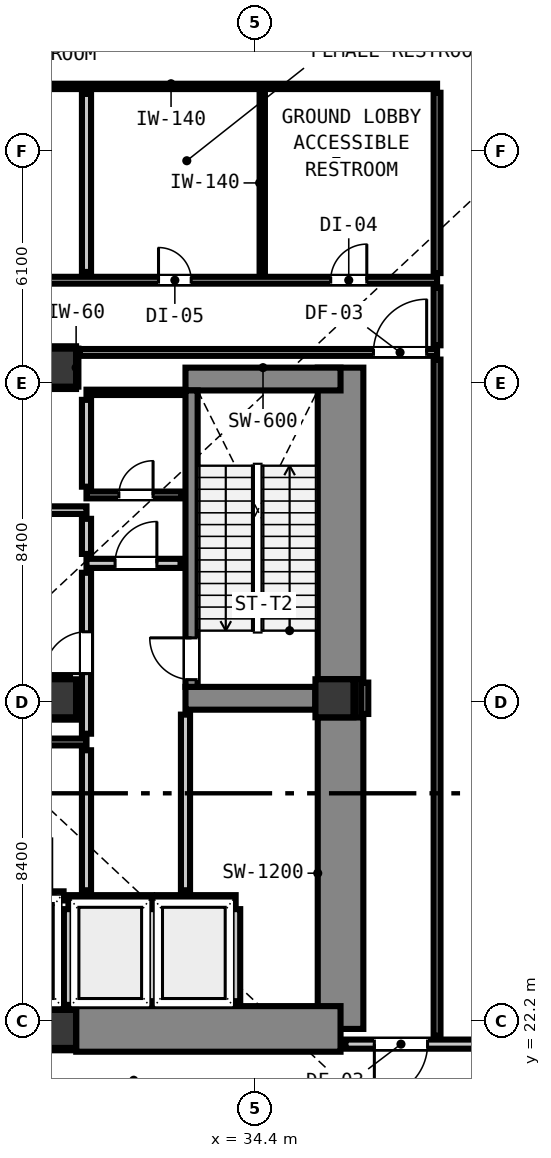
"""IFC4 building model, lengths in metres.
Left out: names, types, materials, properties, quantities, classifications, styles, units other than length and angle.
Written with IfcOpenShell. Run it as: python <this file> out.ifc"""

import sys

from ifc_helpers import new_model, si_unit, direction, frame, frame_2d, origin, origin_2d, place, context, subcontext, project, spatial, rectangle, extrude, element, fill, save


model = new_model("IFC4")
c1 = context("Model", 3, precision=1e-05, world=origin(), true_north=direction((0.0, 1.0)))
c2 = subcontext(c1, "Body", "Model", "MODEL_VIEW")
j1 = project(units=[si_unit("LENGTHUNIT", "METRE"), si_unit("PLANEANGLEUNIT", "RADIAN")], contexts=[c1])
p1 = place(None, origin())
s1 = spatial("IfcSite", under=j1, at=p1, CompositionType="ELEMENT")
p2 = place(p1, origin())
s2 = spatial("IfcBuilding", under=s1, at=p2, CompositionType="ELEMENT")
p3 = place(p2, origin())
s3 = spatial("IfcBuildingStorey", under=s2, at=p3, CompositionType="ELEMENT", Elevation=0.0)
for number, where, z_axis, x_axis in (
    (1, (29.2, 22.0, 0.0), (0.0, 0.0, 1.0), (1.0, 0.0, 0.0)),
    (2, (29.2, 39.4, 0.0), (0.0, 0.0, 1.0), (1.0, 0.0, 0.0)),
    (3, (36.5, 30.7, 0.0), (0.0, 0.0, 1.0), (1.0, 0.0, 0.0)),
):
    element("IfcColumn", number, at=place(p3, frame(where, z_axis=z_axis, x_axis=x_axis)), inside=s3, PredefinedType="COLUMN", context=c2, shape_type="SweptSolid", body=[
        extrude(rectangle(XDim=1.0, YDim=1.0, at=origin_2d()), origin(), (0.0, 0.0, 1.0), 5.2),
    ])
p4 = place(p3, frame((36.66, 22.0, 0.0), z_axis=(0.0, 0.0, 1.0), x_axis=(0.0, 1.0, 0.0)))
e4 = element("IfcWall", 4, at=p4, inside=s3, PredefinedType="SHEAR", context=c2, shape_type="SweptSolid", body=[
    extrude(rectangle(XDim=8.195, YDim=1.2, at=frame_2d((4.098, 0.0))), origin(), (0.0, 0.0, 1.0), 5.2),
])
p5 = place(p3, frame((36.66, 31.205, 0.0), z_axis=(0.0, 0.0, 1.0), x_axis=(0.0, 1.0, 0.0)))
e5 = element("IfcWall", 5, at=p5, inside=s3, PredefinedType="SHEAR", context=c2, shape_type="SweptSolid", body=[
    extrude(rectangle(XDim=8.195, YDim=1.2, at=frame_2d((4.097, 0.0))), origin(), (0.0, 0.0, 1.0), 5.2),
])
p6 = place(p3, frame((29.705, 22.0, 0.0), z_axis=(0.0, 0.0, 1.0), x_axis=(1.0, 0.0, 0.0)))
e6 = element("IfcWall", 6, at=p6, inside=s3, PredefinedType="SHEAR", context=c2, shape_type="SweptSolid", body=[
    extrude(rectangle(XDim=6.955, YDim=1.2, at=frame_2d((3.478, 0.0))), origin(), (0.0, 0.0, 1.0), 5.2),
])
p7 = place(p3, frame((32.58, 39.1, 0.0), z_axis=(0.0, 0.0, 1.0), x_axis=(1.0, 0.0, 0.0)))
e7 = element("IfcWall", 7, at=p7, inside=s3, PredefinedType="SHEAR", context=c2, shape_type="SweptSolid", body=[
    extrude(rectangle(XDim=4.08, YDim=0.6, at=frame_2d((2.04, 0.0))), origin(), (0.0, 0.0, 1.0), 5.2),
])
p8 = place(p3, frame((32.58, 30.7, 0.0), z_axis=(0.0, 0.0, 1.0), x_axis=(1.0, 0.0, 0.0)))
e8 = element("IfcWall", 8, at=p8, inside=s3, PredefinedType="SHEAR", context=c2, shape_type="SweptSolid", body=[
    extrude(rectangle(XDim=3.415, YDim=0.6, at=frame_2d((1.708, 0.0))), origin(), (0.0, 0.0, 1.0), 5.2),
])
p9 = place(p3, frame((32.74, 31.0, 0.0), z_axis=(0.0, 0.0, 1.0), x_axis=(0.0, 1.0, 0.0)))
e9 = element("IfcWall", 9, at=p9, inside=s3, PredefinedType="SHEAR", context=c2, shape_type="SweptSolid", body=[
    extrude(rectangle(XDim=7.8, YDim=0.32, at=frame_2d((3.9, 0.0))), origin(), (0.0, 0.0, 1.0), 5.2),
])
p10 = place(p9, frame((0.19, 0.0, 0.0)))
e10 = element("IfcOpeningElement", 10, at=p10, cuts=e9, PredefinedType="OPENING", context=c2, shape_type="SweptSolid", body=[
    extrude(rectangle(XDim=1.1, YDim=2.15, at=frame_2d((0.55, 1.075))), frame((0.0, 0.17, 0.0), z_axis=(0.0, -1.0, 0.0), x_axis=(1.0, 0.0, 0.0)), (0.0, 0.0, 1.0), 0.34),
])
p11 = place(p3, frame((29.2, 30.7, 0.0), z_axis=(0.0, 0.0, 1.0), x_axis=(1.0, 0.0, 0.0)))
e11 = element("IfcColumn", 11, at=p11, inside=s3, PredefinedType="COLUMN", context=c2, shape_type="SweptSolid", body=[
    extrude(rectangle(XDim=1.0, YDim=1.0, at=origin_2d()), origin(), (0.0, 0.0, 1.0), 5.2),
])
p12 = place(p3, frame((29.5, 25.4, 0.0), z_axis=(0.0, 0.0, 1.0), x_axis=(1.0, 0.0, 0.0)))
e12 = element("IfcWall", 12, at=p12, inside=s3, PredefinedType="PARTITIONING", context=c2, shape_type="SweptSolid", body=[
    extrude(rectangle(XDim=2.2, YDim=0.24, at=frame_2d((1.1, 0.0))), origin(), (0.0, 0.0, 1.0), 4.92),
])
p13 = place(p3, frame((29.5, 22.632, 0.0), z_axis=(0.0, 0.0, 1.0), x_axis=(0.0, 1.0, 0.0)))
e13 = element("IfcWall", 13, at=p13, inside=s3, PredefinedType="PARTITIONING", context=c2, shape_type="SweptSolid", body=[
    extrude(rectangle(XDim=2.52, YDim=0.24, at=frame_2d((1.26, 0.0))), origin(), (0.0, 0.0, 1.0), 3.955),
])
p14 = place(p3, frame((31.7, 22.73, 0.0), z_axis=(0.0, 0.0, 1.0), x_axis=(0.0, 1.0, 0.0)))
e14 = element("IfcWall", 14, at=p14, inside=s3, PredefinedType="PARTITIONING", context=c2, shape_type="SweptSolid", body=[
    extrude(rectangle(XDim=2.422, YDim=0.24, at=frame_2d((1.211, 0.0))), origin(), (0.0, 0.0, 1.0), 4.92),
])
p15 = place(p3, frame((31.828, 25.4, 0.0), z_axis=(0.0, 0.0, 1.0), x_axis=(1.0, 0.0, 0.0)))
e15 = element("IfcWall", 15, at=p15, inside=s3, PredefinedType="PARTITIONING", context=c2, shape_type="SweptSolid", body=[
    extrude(rectangle(XDim=2.072, YDim=0.24, at=frame_2d((1.036, 0.0))), origin(), (0.0, 0.0, 1.0), 4.92),
])
p16 = place(p3, frame((33.9, 22.73, 0.0), z_axis=(0.0, 0.0, 1.0), x_axis=(0.0, 1.0, 0.0)))
e16 = element("IfcWall", 16, at=p16, inside=s3, PredefinedType="PARTITIONING", context=c2, shape_type="SweptSolid", body=[
    extrude(rectangle(XDim=2.422, YDim=0.24, at=frame_2d((1.211, 0.0))), origin(), (0.0, 0.0, 1.0), 4.92),
])
p17 = place(p3, frame((29.103, 25.5, 0.0), z_axis=(0.0, 0.0, 1.0), x_axis=(1.0, 0.0, 0.0)))
e17 = element("IfcWall", 17, at=p17, inside=s3, PredefinedType="PARTITIONING", context=c2, shape_type="SweptSolid", body=[
    extrude(rectangle(XDim=0.269, YDim=0.24, at=frame_2d((0.135, 0.0))), origin(), (0.0, 0.0, 1.0), 4.92),
])
p18 = place(p3, frame((44.6, 21.6, 0.0), z_axis=(0.0, 0.0, 1.0), x_axis=(-1.0, 0.0, 0.0)))
e18 = element("IfcWall", 18, at=p18, inside=s3, PredefinedType="PARTITIONING", context=c2, shape_type="SweptSolid", body=[
    extrude(rectangle(XDim=7.81, YDim=0.24, at=frame_2d((3.905, 0.0))), origin(), (0.0, 0.0, 1.0), 4.155),
])
p19 = place(p18, frame((5.65, 0.0, 0.0)))
e19 = element("IfcOpeningElement", 19, at=p19, cuts=e18, PredefinedType="OPENING", context=c2, shape_type="SweptSolid", body=[
    extrude(rectangle(XDim=1.4, YDim=2.15, at=frame_2d((0.7, 1.075))), frame((0.0, 0.13, 0.0), z_axis=(0.0, -1.0, 0.0), x_axis=(1.0, 0.0, 0.0)), (0.0, 0.0, 1.0), 0.26),
])
p20 = place(p3, frame((29.975, 34.25, 0.0), z_axis=(0.0, 0.0, 1.0), x_axis=(1.0, 0.0, 0.0)))
e20 = element("IfcWall", 20, at=p20, inside=s3, PredefinedType="PARTITIONING", context=c2, shape_type="SweptSolid", body=[
    extrude(rectangle(XDim=2.475, YDim=0.24, at=frame_2d((1.237, 0.0))), origin(), (0.0, 0.0, 1.0), 4.92),
])
p21 = place(p20, frame((0.752, 0.0, 0.0)))
e21 = element("IfcOpeningElement", 21, at=p21, cuts=e20, PredefinedType="OPENING", context=c2, shape_type="SweptSolid", body=[
    extrude(rectangle(XDim=1.1, YDim=2.15, at=frame_2d((0.55, 1.075))), frame((0.0, 0.13, 0.0), z_axis=(0.0, -1.0, 0.0), x_axis=(1.0, 0.0, 0.0)), (0.0, 0.0, 1.0), 0.26),
])
p22 = place(p3, frame((28.604, 35.65, 0.0), z_axis=(0.0, 0.0, 1.0), x_axis=(1.0, 0.0, 0.0)))
e22 = element("IfcWall", 22, at=p22, inside=s3, PredefinedType="PARTITIONING", context=c2, shape_type="SweptSolid", body=[
    extrude(rectangle(XDim=1.371, YDim=0.2, at=frame_2d((0.686, 0.0))), origin(), (0.0, 0.0, 1.0), 4.92),
])
p23 = place(p3, frame((28.593, 29.55, 0.0), z_axis=(0.0, 0.0, 1.0), x_axis=(1.0, 0.0, 0.0)))
e23 = element("IfcWall", 23, at=p23, inside=s3, PredefinedType="PARTITIONING", context=c2, shape_type="SweptSolid", body=[
    extrude(rectangle(XDim=1.382, YDim=0.18, at=frame_2d((0.691, 0.0))), origin(), (0.0, 0.0, 1.0), 4.92),
])
p24 = place(p3, frame((29.975, 36.05, 0.0), z_axis=(0.0, 0.0, 1.0), x_axis=(1.0, 0.0, 0.0)))
e24 = element("IfcWall", 24, at=p24, inside=s3, PredefinedType="PARTITIONING", context=c2, shape_type="SweptSolid", body=[
    extrude(rectangle(XDim=2.505, YDim=0.18, at=frame_2d((1.252, 0.0))), origin(), (0.0, 0.0, 1.0), 4.92),
])
p25 = place(p24, frame((0.852, 0.0, 0.0)))
e25 = element("IfcOpeningElement", 25, at=p25, cuts=e24, PredefinedType="OPENING", context=c2, shape_type="SweptSolid", body=[
    extrude(rectangle(XDim=0.9, YDim=2.1, at=frame_2d((0.45, 1.05))), frame((0.0, 0.1, 0.0), z_axis=(0.0, -1.0, 0.0), x_axis=(1.0, 0.0, 0.0)), (0.0, 0.0, 1.0), 0.2),
])
p26 = place(p3, frame((29.802, 39.8, 0.0), z_axis=(0.0, 0.0, 1.0), x_axis=(1.0, 0.0, 0.0)))
e26 = element("IfcWall", 26, at=p26, inside=s3, PredefinedType="PARTITIONING", context=c2, shape_type="SweptSolid", body=[
    extrude(rectangle(XDim=9.398, YDim=0.18, at=frame_2d((4.699, 0.0))), origin(), (0.0, 0.0, 1.0), 4.155),
])
p27 = place(p26, frame((7.724, 0.0, 0.0)))
e27 = element("IfcOpeningElement", 27, at=p27, cuts=e26, PredefinedType="OPENING", context=c2, shape_type="SweptSolid", body=[
    extrude(rectangle(XDim=1.4, YDim=2.15, at=frame_2d((0.7, 1.075))), frame((0.0, 0.1, 0.0), z_axis=(0.0, -1.0, 0.0), x_axis=(1.0, 0.0, 0.0)), (0.0, 0.0, 1.0), 0.2),
])
p28 = place(p3, frame((4.352, 41.7, 0.0), z_axis=(0.0, 0.0, 1.0), x_axis=(1.0, 0.0, 0.0)))
e28 = element("IfcWall", 28, at=p28, inside=s3, PredefinedType="PARTITIONING", context=c2, shape_type="SweptSolid", body=[
    extrude(rectangle(XDim=34.848, YDim=0.18, at=frame_2d((17.424, 0.0))), origin(), (0.0, 0.0, 1.0), 4.92),
])
p29 = place(p28, frame((18.448, 0.0, 0.0)))
e29 = element("IfcOpeningElement", 29, at=p29, cuts=e28, PredefinedType="OPENING", context=c2, shape_type="SweptSolid", body=[
    extrude(rectangle(XDim=1.4, YDim=2.15, at=frame_2d((0.7, 1.075))), frame((0.0, 0.1, 0.0), z_axis=(0.0, -1.0, 0.0), x_axis=(1.0, 0.0, 0.0)), (0.0, 0.0, 1.0), 0.2),
])
p30 = place(p28, frame((9.258, 0.0, 0.0)))
e30 = element("IfcOpeningElement", 30, at=p30, cuts=e28, PredefinedType="OPENING", context=c2, shape_type="SweptSolid", body=[
    extrude(rectangle(XDim=0.9, YDim=2.1, at=frame_2d((0.45, 1.05))), frame((0.0, 0.1, 0.0), z_axis=(0.0, -1.0, 0.0), x_axis=(1.0, 0.0, 0.0)), (0.0, 0.0, 1.0), 0.2),
])
p31 = place(p28, frame((14.898, 0.0, 0.0)))
e31 = element("IfcOpeningElement", 31, at=p31, cuts=e28, PredefinedType="OPENING", context=c2, shape_type="SweptSolid", body=[
    extrude(rectangle(XDim=0.9, YDim=2.1, at=frame_2d((0.45, 1.05))), frame((0.0, 0.1, 0.0), z_axis=(0.0, -1.0, 0.0), x_axis=(1.0, 0.0, 0.0)), (0.0, 0.0, 1.0), 0.2),
])
p32 = place(p28, frame((22.818, 0.0, 0.0)))
e32 = element("IfcOpeningElement", 32, at=p32, cuts=e28, PredefinedType="OPENING", context=c2, shape_type="SweptSolid", body=[
    extrude(rectangle(XDim=0.86, YDim=2.02, at=frame_2d((0.43, 1.01))), frame((0.0, 0.1, 0.0), z_axis=(0.0, -1.0, 0.0), x_axis=(1.0, 0.0, 0.0)), (0.0, 0.0, 1.0), 0.2),
])
p33 = place(p28, frame((27.518, 0.0, 0.0)))
e33 = element("IfcOpeningElement", 33, at=p33, cuts=e28, PredefinedType="OPENING", context=c2, shape_type="SweptSolid", body=[
    extrude(rectangle(XDim=0.86, YDim=2.02, at=frame_2d((0.43, 1.01))), frame((0.0, 0.1, 0.0), z_axis=(0.0, -1.0, 0.0), x_axis=(1.0, 0.0, 0.0)), (0.0, 0.0, 1.0), 0.2),
])
p34 = place(p28, frame((32.049, 0.0, 0.0)))
e34 = element("IfcOpeningElement", 34, at=p34, cuts=e28, PredefinedType="OPENING", context=c2, shape_type="SweptSolid", body=[
    extrude(rectangle(XDim=0.95, YDim=2.1, at=frame_2d((0.475, 1.05))), frame((0.0, 0.1, 0.0), z_axis=(0.0, -1.0, 0.0), x_axis=(1.0, 0.0, 0.0)), (0.0, 0.0, 1.0), 0.2),
])
p35 = place(p3, frame((29.975, 38.75, 0.0), z_axis=(0.0, 0.0, 1.0), x_axis=(1.0, 0.0, 0.0)))
e35 = element("IfcWall", 35, at=p35, inside=s3, PredefinedType="PARTITIONING", context=c2, shape_type="SweptSolid", body=[
    extrude(rectangle(XDim=2.525, YDim=0.14, at=frame_2d((1.262, 0.0))), origin(), (0.0, 0.0, 1.0), 4.92),
])
p36 = place(p3, frame((25.2, 46.8, 0.0), z_axis=(0.0, 0.0, 1.0), x_axis=(1.0, 0.0, 0.0)))
e36 = element("IfcWall", 36, at=p36, inside=s3, PredefinedType="PARTITIONING", context=c2, shape_type="SweptSolid", body=[
    extrude(rectangle(XDim=14.0, YDim=0.14, at=frame_2d((7.0, 0.0))), origin(), (0.0, 0.0, 1.0), 4.92),
])
p37 = place(p3, frame((29.975, 25.648, 0.0), z_axis=(0.0, 0.0, 1.0), x_axis=(0.0, 1.0, 0.0)))
e37 = element("IfcWall", 37, at=p37, inside=s3, PredefinedType="PARTITIONING", context=c2, shape_type="SweptSolid", body=[
    extrude(rectangle(XDim=3.684, YDim=0.24, at=frame_2d((1.842, 0.0))), origin(), (0.0, 0.0, 1.0), 4.92),
])
p38 = place(p3, frame((29.975, 29.768, 0.0), z_axis=(0.0, 0.0, 1.0), x_axis=(0.0, 1.0, 0.0)))
e38 = element("IfcWall", 38, at=p38, inside=s3, PredefinedType="PARTITIONING", context=c2, shape_type="SweptSolid", body=[
    extrude(rectangle(XDim=4.234, YDim=0.24, at=frame_2d((2.117, 0.0))), origin(), (0.0, 0.0, 1.0), 4.92),
])
p39 = place(p38, frame((1.582, 0.0, 0.0)))
e39 = element("IfcOpeningElement", 39, at=p39, cuts=e38, PredefinedType="OPENING", context=c2, shape_type="SweptSolid", body=[
    extrude(rectangle(XDim=1.1, YDim=2.15, at=frame_2d((0.55, 1.075))), frame((0.0, 0.13, 0.0), z_axis=(0.0, -1.0, 0.0), x_axis=(1.0, 0.0, 0.0)), (0.0, 0.0, 1.0), 0.26),
])
p40 = place(p3, frame((29.975, 34.498, 0.0), z_axis=(0.0, 0.0, 1.0), x_axis=(0.0, 1.0, 0.0)))
e40 = element("IfcWall", 40, at=p40, inside=s3, PredefinedType="PARTITIONING", context=c2, shape_type="SweptSolid", body=[
    extrude(rectangle(XDim=0.924, YDim=0.24, at=frame_2d((0.462, 0.0))), origin(), (0.0, 0.0, 1.0), 4.92),
])
p41 = place(p3, frame((29.975, 36.268, 0.0), z_axis=(0.0, 0.0, 1.0), x_axis=(0.0, 1.0, 0.0)))
e41 = element("IfcWall", 41, at=p41, inside=s3, PredefinedType="PARTITIONING", context=c2, shape_type="SweptSolid", body=[
    extrude(rectangle(XDim=2.284, YDim=0.24, at=frame_2d((1.142, 0.0))), origin(), (0.0, 0.0, 1.0), 4.92),
])
p42 = place(p3, frame((29.975, 41.918, 0.0), z_axis=(0.0, 0.0, 1.0), x_axis=(0.0, 1.0, 0.0)))
e42 = element("IfcWall", 42, at=p42, inside=s3, PredefinedType="PARTITIONING", context=c2, shape_type="SweptSolid", body=[
    extrude(rectangle(XDim=4.684, YDim=0.24, at=frame_2d((2.342, 0.0))), origin(), (0.0, 0.0, 1.0), 4.92),
])
p43 = place(p3, frame((32.58, 25.648, 0.0), z_axis=(0.0, 0.0, 1.0), x_axis=(0.0, 1.0, 0.0)))
e43 = element("IfcWall", 43, at=p43, inside=s3, PredefinedType="PARTITIONING", context=c2, shape_type="SweptSolid", body=[
    extrude(rectangle(XDim=4.622, YDim=0.24, at=frame_2d((2.311, 0.0))), origin(), (0.0, 0.0, 1.0), 4.92),
])
p44 = place(p3, frame((37.3, 30.287, 0.0), z_axis=(0.0, 0.0, 1.0), x_axis=(0.0, 1.0, 0.0)))
e44 = element("IfcWall", 44, at=p44, inside=s3, PredefinedType="PARTITIONING", context=c2, shape_type="SweptSolid", body=[
    extrude(rectangle(XDim=0.826, YDim=0.18, at=frame_2d((0.413, 0.0))), origin(), (0.0, 0.0, 1.0), 4.92),
])
p45 = place(p3, frame((39.2, 21.818, 0.0), z_axis=(0.0, 0.0, 1.0), x_axis=(0.0, 1.0, 0.0)))
e45 = element("IfcWall", 45, at=p45, inside=s3, PredefinedType="PARTITIONING", context=c2, shape_type="SweptSolid", body=[
    extrude(rectangle(XDim=17.794, YDim=0.18, at=frame_2d((8.897, 0.0))), origin(), (0.0, 0.0, 1.0), 4.92),
])
p46 = place(p3, frame((39.2, 39.988, 0.0), z_axis=(0.0, 0.0, 1.0), x_axis=(0.0, 1.0, 0.0)))
e46 = element("IfcWall", 46, at=p46, inside=s3, PredefinedType="PARTITIONING", context=c2, shape_type="SweptSolid", body=[
    extrude(rectangle(XDim=1.524, YDim=0.18, at=frame_2d((0.762, 0.0))), origin(), (0.0, 0.0, 1.0), 4.92),
])
p47 = place(p3, frame((39.2, 41.888, 0.0), z_axis=(0.0, 0.0, 1.0), x_axis=(0.0, 1.0, 0.0)))
e47 = element("IfcWall", 47, at=p47, inside=s3, PredefinedType="PARTITIONING", context=c2, shape_type="SweptSolid", body=[
    extrude(rectangle(XDim=4.744, YDim=0.18, at=frame_2d((2.372, 0.0))), origin(), (0.0, 0.0, 1.0), 4.92),
])
p48 = place(p3, frame((34.6, 41.868, 0.0), z_axis=(0.0, 0.0, 1.0), x_axis=(0.0, 1.0, 0.0)))
e48 = element("IfcWall", 48, at=p48, inside=s3, PredefinedType="PARTITIONING", context=c2, shape_type="SweptSolid", body=[
    extrude(rectangle(XDim=4.784, YDim=0.14, at=frame_2d((2.392, 0.0))), origin(), (0.0, 0.0, 1.0), 4.92),
])
for number, where, z_axis, x_axis in (
    (49, (28.71, 21.468, 0.0), (0.0, 0.0, 1.0), (1.0, 0.0, 0.0)),
    (50, (28.71, 22.532, 0.0), (0.0, 0.0, 1.0), (1.0, 0.0, 0.0)),
):
    element("IfcWall", number, at=place(p3, frame(where, z_axis=z_axis, x_axis=x_axis)), inside=s3, PredefinedType="PARTITIONING", context=c2, shape_type="SweptSolid", body=[
        extrude(rectangle(XDim=0.98, YDim=0.06, at=frame_2d((0.49, 0.0))), origin(), (0.0, 0.0, 1.0), 1.45),
    ])
for number, where, z_axis, x_axis in (
    (51, (28.71, 38.868, 0.0), (0.0, 0.0, 1.0), (1.0, 0.0, 0.0)),
    (52, (28.71, 39.932, 0.0), (0.0, 0.0, 1.0), (1.0, 0.0, 0.0)),
):
    element("IfcWall", number, at=place(p3, frame(where, z_axis=z_axis, x_axis=x_axis)), inside=s3, PredefinedType="PARTITIONING", context=c2, shape_type="SweptSolid", body=[
        extrude(rectangle(XDim=0.99, YDim=0.06, at=frame_2d((0.495, 0.0))), origin(), (0.0, 0.0, 1.0), 1.45),
    ])
p49 = place(p3, frame((29.732, 38.9, 0.0), z_axis=(0.0, 0.0, 1.0), x_axis=(0.0, 1.0, 0.0)))
e53 = element("IfcWall", 53, at=p49, inside=s3, PredefinedType="PARTITIONING", context=c2, shape_type="SweptSolid", body=[
    extrude(rectangle(XDim=1.0, YDim=0.06, at=frame_2d((0.5, 0.0))), origin(), (0.0, 0.0, 1.0), 1.45),
])
p50 = place(p3, frame((37.032, 30.21, 0.0), z_axis=(0.0, 0.0, 1.0), x_axis=(0.0, 1.0, 0.0)))
e54 = element("IfcWall", 54, at=p50, inside=s3, PredefinedType="PARTITIONING", context=c2, shape_type="SweptSolid", body=[
    extrude(rectangle(XDim=0.98, YDim=0.06, at=frame_2d((0.49, 0.0))), origin(), (0.0, 0.0, 1.0), 1.45),
])
p51 = place(p3, frame((28.7, 30.168, 0.0), z_axis=(0.0, 0.0, 1.0), x_axis=(1.0, 0.0, 0.0)))
e55 = element("IfcWall", 55, at=p51, inside=s3, PredefinedType="PARTITIONING", context=c2, shape_type="SweptSolid", body=[
    extrude(rectangle(XDim=1.0, YDim=0.06, at=frame_2d((0.5, 0.0))), origin(), (0.0, 0.0, 1.0), 1.45),
])
p52 = place(p3, frame((28.7, 31.232, 0.0), z_axis=(0.0, 0.0, 1.0), x_axis=(1.0, 0.0, 0.0)))
e56 = element("IfcWall", 56, at=p52, inside=s3, PredefinedType="PARTITIONING", context=c2, shape_type="SweptSolid", body=[
    extrude(rectangle(XDim=0.841, YDim=0.06, at=frame_2d((0.42, 0.0))), origin(), (0.0, 0.0, 1.0), 1.45),
])
p53 = place(p3, frame((29.732, 30.2, 0.0), z_axis=(0.0, 0.0, 1.0), x_axis=(0.0, 1.0, 0.0)))
e57 = element("IfcWall", 57, at=p53, inside=s3, PredefinedType="PARTITIONING", context=c2, shape_type="SweptSolid", body=[
    extrude(rectangle(XDim=0.772, YDim=0.06, at=frame_2d((0.386, 0.0))), origin(), (0.0, 0.0, 1.0), 1.45),
])
p54 = place(p10, origin())
e58 = element("IfcDoor", 58, at=p54, inside=s3, OperationType="SINGLE_SWING_RIGHT", PredefinedType="DOOR", context=c2, shape_type="SweptSolid", body=[
    extrude(rectangle(XDim=1.1, YDim=2.15, at=frame_2d((0.55, 1.075))), frame((0.0, 0.025, 0.0), z_axis=(0.0, -1.0, 0.0), x_axis=(1.0, 0.0, 0.0)), (0.0, 0.0, 1.0), 0.05),
])
fill(e10, e58)
p55 = place(p39, origin())
e59 = element("IfcDoor", 59, at=p55, inside=s3, OperationType="SINGLE_SWING_LEFT", PredefinedType="DOOR", context=c2, shape_type="SweptSolid", body=[
    extrude(rectangle(XDim=1.1, YDim=2.15, at=frame_2d((0.55, 1.075))), frame((0.0, 0.025, 0.0), z_axis=(0.0, -1.0, 0.0), x_axis=(1.0, 0.0, 0.0)), (0.0, 0.0, 1.0), 0.05),
])
fill(e39, e59)
p56 = place(p21, origin())
e60 = element("IfcDoor", 60, at=p56, inside=s3, OperationType="SINGLE_SWING_RIGHT", PredefinedType="DOOR", context=c2, shape_type="SweptSolid", body=[
    extrude(rectangle(XDim=1.1, YDim=2.15, at=frame_2d((0.55, 1.075))), frame((0.0, 0.025, 0.0), z_axis=(0.0, -1.0, 0.0), x_axis=(1.0, 0.0, 0.0)), (0.0, 0.0, 1.0), 0.05),
])
fill(e21, e60)
p57 = place(p19, origin())
e61 = element("IfcDoor", 61, at=p57, inside=s3, OperationType="SINGLE_SWING_RIGHT", PredefinedType="DOOR", context=c2, shape_type="SweptSolid", body=[
    extrude(rectangle(XDim=1.4, YDim=2.15, at=frame_2d((0.7, 1.075))), frame((0.0, 0.025, 0.0), z_axis=(0.0, -1.0, 0.0), x_axis=(1.0, 0.0, 0.0)), (0.0, 0.0, 1.0), 0.05),
])
fill(e19, e61)
p58 = place(p27, origin())
e62 = element("IfcDoor", 62, at=p58, inside=s3, OperationType="SINGLE_SWING_RIGHT", PredefinedType="DOOR", context=c2, shape_type="SweptSolid", body=[
    extrude(rectangle(XDim=1.4, YDim=2.15, at=frame_2d((0.7, 1.075))), frame((0.0, 0.025, 0.0), z_axis=(0.0, -1.0, 0.0), x_axis=(1.0, 0.0, 0.0)), (0.0, 0.0, 1.0), 0.05),
])
fill(e27, e62)
p59 = place(p25, origin())
e63 = element("IfcDoor", 63, at=p59, inside=s3, OperationType="SINGLE_SWING_RIGHT", PredefinedType="DOOR", context=c2, shape_type="SweptSolid", body=[
    extrude(rectangle(XDim=0.9, YDim=2.1, at=frame_2d((0.45, 1.05))), frame((0.0, 0.025, 0.0), z_axis=(0.0, -1.0, 0.0), x_axis=(1.0, 0.0, 0.0)), (0.0, 0.0, 1.0), 0.05),
])
fill(e25, e63)
p60 = place(p33, origin())
e64 = element("IfcDoor", 64, at=p60, inside=s3, OperationType="SINGLE_SWING_LEFT", PredefinedType="DOOR", context=c2, shape_type="SweptSolid", body=[
    extrude(rectangle(XDim=0.86, YDim=2.02, at=frame_2d((0.43, 1.01))), frame((0.0, 0.025, 0.0), z_axis=(0.0, -1.0, 0.0), x_axis=(1.0, 0.0, 0.0)), (0.0, 0.0, 1.0), 0.05),
])
fill(e33, e64)
p61 = place(p34, origin())
e65 = element("IfcDoor", 65, at=p61, inside=s3, OperationType="SINGLE_SWING_RIGHT", PredefinedType="DOOR", context=c2, shape_type="SweptSolid", body=[
    extrude(rectangle(XDim=0.95, YDim=2.1, at=frame_2d((0.475, 1.05))), frame((0.0, 0.025, 0.0), z_axis=(0.0, -1.0, 0.0), x_axis=(1.0, 0.0, 0.0)), (0.0, 0.0, 1.0), 0.05),
])
fill(e34, e65)
save(model, sys.argv[1])
